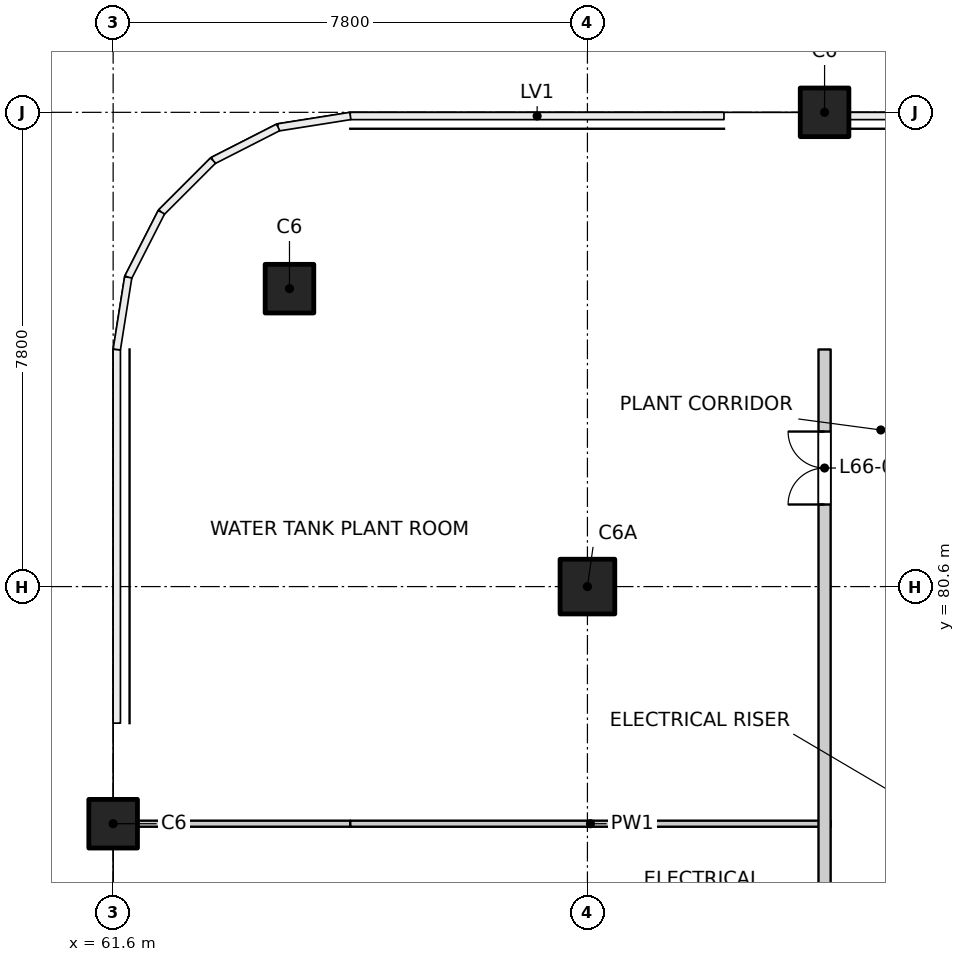
"""IFC4 building model, lengths in metres.
Left out: names, types, materials, properties, quantities, classifications, styles, units other than length and angle.
Written with IfcOpenShell. Run it as: python <this file> out.ifc"""

import sys

from ifc_helpers import new_model, si_unit, direction, frame, frame_2d, origin, origin_2d, place, context, subcontext, project, spatial, rectangle, extrude, element, fill, save


model = new_model("IFC4")
c1 = context("Model", 3, precision=1e-05, world=origin(), true_north=direction((0.0, 1.0)))
c2 = subcontext(c1, "Body", "Model", "MODEL_VIEW")
j1 = project(units=[si_unit("LENGTHUNIT", "METRE"), si_unit("PLANEANGLEUNIT", "RADIAN")], contexts=[c1])
p1 = place(None, origin())
s1 = spatial("IfcSite", under=j1, at=p1, CompositionType="ELEMENT")
p2 = place(p1, origin())
s2 = spatial("IfcBuilding", under=s1, at=p2, CompositionType="ELEMENT")
p3 = place(p2, frame((0.0, 0.0, 241.5)))
s3 = spatial("IfcBuildingStorey", under=s2, at=p3, CompositionType="ELEMENT", Elevation=241.5)
for number, where, z_axis, x_axis in (
    (1, (64.5, 85.5, -0.3), (0.0, 0.0, 1.0), (1.0, 0.0, 0.0)),
    (2, (73.3, 88.4, -0.3), (0.0, 0.0, 1.0), (1.0, 0.0, 0.0)),
    (3, (61.6, 76.7, -0.3), (0.0, 0.0, 1.0), (1.0, 0.0, 0.0)),
):
    element("IfcColumn", number, at=place(p3, frame(where, z_axis=z_axis, x_axis=x_axis)), inside=s3, PredefinedType="COLUMN", context=c2, shape_type="SweptSolid", body=[
        extrude(rectangle(XDim=0.8, YDim=0.8, at=origin_2d()), origin(), (0.0, 0.0, 1.0), 4.5),
    ])
p4 = place(p3, frame((69.4, 80.6, -0.3), z_axis=(0.0, 0.0, 1.0), x_axis=(1.0, 0.0, 0.0)))
e4 = element("IfcColumn", 4, at=p4, inside=s3, PredefinedType="COLUMN", context=c2, shape_type="SweptSolid", body=[
    extrude(rectangle(XDim=0.9, YDim=0.9, at=origin_2d()), origin(), (0.0, 0.0, 1.0), 4.5),
])
p5 = place(p3, frame((61.6, 76.7, 0.0), z_axis=(0.0, 0.0, 1.0), x_axis=(1.0, 0.0, 0.0)))
e5 = element("IfcWall", 5, at=p5, inside=s3, PredefinedType="PARTITIONING", context=c2, shape_type="SweptSolid", body=[
    extrude(rectangle(XDim=3.9, YDim=0.1, at=frame_2d((1.95, 0.0))), origin(), (0.0, 0.0, 1.0), 2.6),
])
p6 = place(p3, frame((65.5, 76.7, 0.0), z_axis=(0.0, 0.0, 1.0), x_axis=(1.0, 0.0, 0.0)))
e6 = element("IfcWall", 6, at=p6, inside=s3, PredefinedType="PARTITIONING", context=c2, shape_type="SweptSolid", body=[
    extrude(rectangle(XDim=7.9, YDim=0.1, at=frame_2d((3.95, 0.0))), origin(), (0.0, 0.0, 1.0), 3.6),
])
p7 = place(p3, frame((73.3, 55.35, 0.0), z_axis=(0.0, 0.0, 1.0), x_axis=(0.0, 1.0, 0.0)))
e7 = element("IfcWall", 7, at=p7, inside=s3, PredefinedType="PARTITIONING", context=c2, shape_type="SweptSolid", body=[
    extrude(rectangle(XDim=29.15, YDim=0.2, at=frame_2d((14.575, 0.0))), origin(), (0.0, 0.0, 1.0), 4.2),
])
p8 = place(p7, frame((0.35, 0.0, 0.0)))
e8 = element("IfcOpeningElement", 8, at=p8, cuts=e7, PredefinedType="OPENING", context=c2, shape_type="SweptSolid", body=[
    extrude(rectangle(XDim=1.2, YDim=2.1, at=frame_2d((0.6, 1.05))), frame((0.0, 0.11, 0.0), z_axis=(0.0, -1.0, 0.0), x_axis=(1.0, 0.0, 0.0)), (0.0, 0.0, 1.0), 0.22),
])
p9 = place(p7, frame((7.1, 0.0, 0.0)))
e9 = element("IfcOpeningElement", 9, at=p9, cuts=e7, PredefinedType="OPENING", context=c2, shape_type="SweptSolid", body=[
    extrude(rectangle(XDim=1.2, YDim=2.1, at=frame_2d((0.6, 1.05))), frame((0.0, 0.11, 0.0), z_axis=(0.0, -1.0, 0.0), x_axis=(1.0, 0.0, 0.0)), (0.0, 0.0, 1.0), 0.22),
])
p10 = place(p7, frame((18.8, 0.0, 0.0)))
e10 = element("IfcOpeningElement", 10, at=p10, cuts=e7, PredefinedType="OPENING", context=c2, shape_type="SweptSolid", body=[
    extrude(rectangle(XDim=1.2, YDim=2.1, at=frame_2d((0.6, 1.05))), frame((0.0, 0.11, 0.0), z_axis=(0.0, -1.0, 0.0), x_axis=(1.0, 0.0, 0.0)), (0.0, 0.0, 1.0), 0.22),
])
p11 = place(p7, frame((26.6, 0.0, 0.0)))
e11 = element("IfcOpeningElement", 11, at=p11, cuts=e7, PredefinedType="OPENING", context=c2, shape_type="SweptSolid", body=[
    extrude(rectangle(XDim=1.2, YDim=2.1, at=frame_2d((0.6, 1.05))), frame((0.0, 0.11, 0.0), z_axis=(0.0, -1.0, 0.0), x_axis=(1.0, 0.0, 0.0)), (0.0, 0.0, 1.0), 0.22),
])
p12 = place(p11, origin())
e12 = element("IfcDoor", 12, at=p12, inside=s3, OperationType="DOUBLE_DOOR_SINGLE_SWING", PredefinedType="DOOR", context=c2, shape_type="SweptSolid", body=[
    extrude(rectangle(XDim=1.2, YDim=2.1, at=frame_2d((0.6, 1.05))), frame((0.0, 0.025, 0.0), z_axis=(0.0, -1.0, 0.0), x_axis=(1.0, 0.0, 0.0)), (0.0, 0.0, 1.0), 0.05),
])
fill(e11, e12)
save(model, sys.argv[1])
